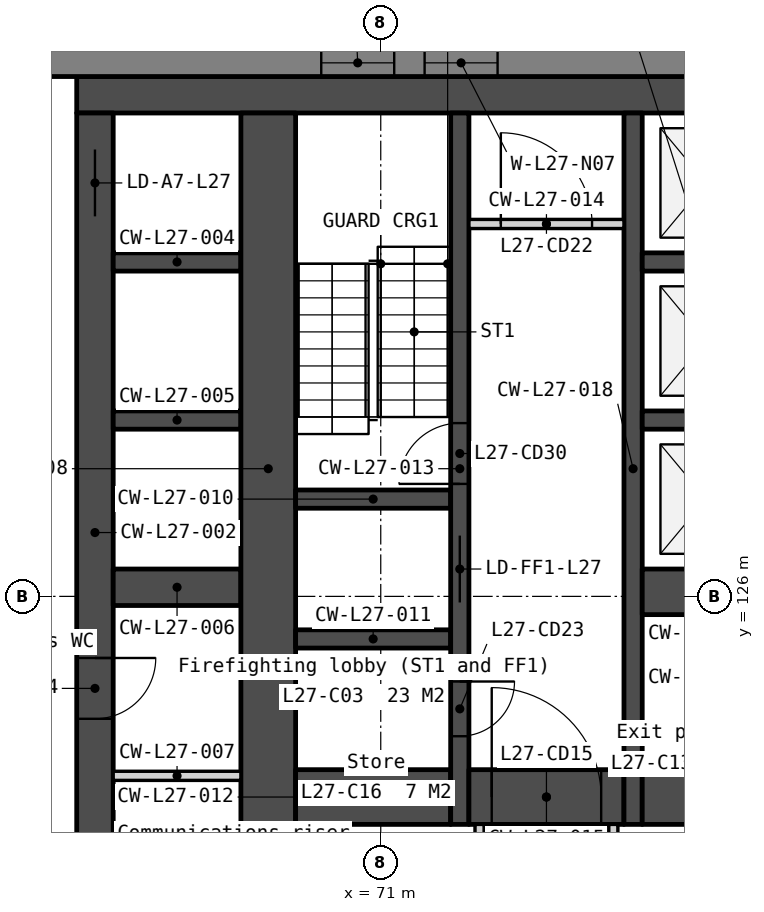
"""IFC4 building model, lengths in metres.
Left out: names, types, materials, properties, quantities, classifications, styles, units other than length and angle.
Written with IfcOpenShell. Run it as: python <this file> out.ifc"""

import sys

from ifc_helpers import new_model, si_unit, direction, frame, frame_2d, origin, place, context, subcontext, project, spatial, polyline, rectangle, outline, extrude, element, fill, save


model = new_model("IFC4")
c1 = context("Model", 3, precision=1e-05, world=origin(), true_north=direction((0.0, 1.0)))
c2 = subcontext(c1, "Body", "Model", "MODEL_VIEW")
j1 = project(units=[si_unit("LENGTHUNIT", "METRE"), si_unit("PLANEANGLEUNIT", "RADIAN")], contexts=[c1])
p1 = place(None, origin())
s1 = spatial("IfcSite", under=j1, at=p1, CompositionType="ELEMENT")
p2 = place(p1, origin())
s2 = spatial("IfcBuilding", under=s1, at=p2, CompositionType="ELEMENT")
p3 = place(p2, frame((0.0, 0.0, 109.8)))
s3 = spatial("IfcBuildingStorey", under=s2, at=p3, CompositionType="ELEMENT", Elevation=109.8)
p4 = place(p3, frame((66.0, 134.25, 0.0), z_axis=(0.0, 0.0, 1.0), x_axis=(1.0, 0.0, 0.0)))
e1 = element("IfcWall", 1, at=p4, inside=s3, PredefinedType="SOLIDWALL", context=c2, shape_type="SweptSolid", body=[
    extrude(rectangle(XDim=28.0, YDim=0.6, at=frame_2d((14.0, 0.0))), origin(), (0.0, 0.0, 1.0), 3.35),
])
p5 = place(p3, frame((66.3, 133.95, 0.0), z_axis=(0.0, 0.0, 1.0), x_axis=(0.0, -1.0, 0.0)))
e2 = element("IfcWall", 2, at=p5, inside=s3, PredefinedType="SOLIDWALL", context=c2, shape_type="SweptSolid", body=[
    extrude(rectangle(XDim=13.8, YDim=0.6, at=frame_2d((6.9, 0.0))), origin(), (0.0, 0.0, 1.0), 3.35),
])
p6 = place(p5, frame((0.6, 0.0, 0.0)))
e3 = element("IfcOpeningElement", 3, at=p6, cuts=e2, PredefinedType="OPENING", context=c2, shape_type="SweptSolid", body=[
    extrude(rectangle(XDim=1.1, YDim=2.1, at=frame_2d((0.55, 1.05))), frame((0.0, 0.31, 0.0), z_axis=(0.0, -1.0, 0.0), x_axis=(1.0, 0.0, 0.0)), (0.0, 0.0, 1.0), 0.62),
])
p7 = place(p5, frame((8.963, 0.0, 0.0)))
e4 = element("IfcOpeningElement", 4, at=p7, cuts=e2, PredefinedType="OPENING", context=c2, shape_type="SweptSolid", body=[
    extrude(rectangle(XDim=1.0, YDim=2.1, at=frame_2d((0.5, 1.05))), frame((0.0, 0.31, 0.0), z_axis=(0.0, -1.0, 0.0), x_axis=(1.0, 0.0, 0.0)), (0.0, 0.0, 1.0), 0.62),
])
p8 = place(p5, frame((11.888, 0.0, 0.0)))
e5 = element("IfcOpeningElement", 5, at=p8, cuts=e2, PredefinedType="OPENING", context=c2, shape_type="SweptSolid", body=[
    extrude(rectangle(XDim=1.0, YDim=2.1, at=frame_2d((0.5, 1.05))), frame((0.0, 0.31, 0.0), z_axis=(0.0, -1.0, 0.0), x_axis=(1.0, 0.0, 0.0)), (0.0, 0.0, 1.0), 0.62),
])
for number, where, z_axis, x_axis in (
    (6, (66.6, 131.5, 0.0), (0.0, 0.0, 1.0), (1.0, 0.0, 0.0)),
    (7, (66.6, 128.9, 0.0), (0.0, 0.0, 1.0), (1.0, 0.0, 0.0)),
):
    element("IfcWall", number, at=place(p3, frame(where, z_axis=z_axis, x_axis=x_axis)), inside=s3, PredefinedType="SOLIDWALL", context=c2, shape_type="SweptSolid", body=[
        extrude(rectangle(XDim=2.1, YDim=0.3, at=frame_2d((1.05, 0.0))), origin(), (0.0, 0.0, 1.0), 3.35),
    ])
p9 = place(p3, frame((66.6, 126.15, 0.0), z_axis=(0.0, 0.0, 1.0), x_axis=(1.0, 0.0, 0.0)))
e8 = element("IfcWall", 8, at=p9, inside=s3, PredefinedType="SOLIDWALL", context=c2, shape_type="SweptSolid", body=[
    extrude(rectangle(XDim=2.1, YDim=0.6, at=frame_2d((1.05, 0.0))), origin(), (0.0, 0.0, 1.0), 3.35),
])
p10 = place(p3, frame((66.6, 123.049, 0.0), z_axis=(0.0, 0.0, 1.0), x_axis=(1.0, 0.0, 0.0)))
e9 = element("IfcWall", 9, at=p10, inside=s3, PredefinedType="PARTITIONING", context=c2, shape_type="SweptSolid", body=[
    extrude(rectangle(XDim=2.1, YDim=0.15, at=frame_2d((1.05, 0.0))), origin(), (0.0, 0.0, 1.0), 3.35),
])
p11 = place(p3, frame((69.15, 133.95, 0.0), z_axis=(0.0, 0.0, 1.0), x_axis=(0.0, -1.0, 0.0)))
e10 = element("IfcWall", 10, at=p11, inside=s3, PredefinedType="SOLIDWALL", context=c2, shape_type="SweptSolid", body=[
    extrude(rectangle(XDim=11.7, YDim=0.9, at=frame_2d((5.85, 0.0))), origin(), (0.0, 0.0, 1.0), 3.35),
])
p12 = place(p3, frame((69.0, 122.25, 0.0), z_axis=(0.0, 0.0, 1.0), x_axis=(0.0, -1.0, 0.0)))
e11 = element("IfcWall", 11, at=p12, inside=s3, PredefinedType="SOLIDWALL", context=c2, shape_type="SweptSolid", body=[
    extrude(rectangle(XDim=2.1, YDim=0.6, at=frame_2d((1.05, 0.0))), origin(), (0.0, 0.0, 1.0), 3.35),
])
for number, where, z_axis, x_axis in (
    (12, (69.6, 127.6, 0.0), (0.0, 0.0, 1.0), (1.0, 0.0, 0.0)),
    (13, (69.6, 125.3, 0.0), (0.0, 0.0, 1.0), (1.0, 0.0, 0.0)),
):
    element("IfcWall", number, at=place(p3, frame(where, z_axis=z_axis, x_axis=x_axis)), inside=s3, PredefinedType="SOLIDWALL", context=c2, shape_type="SweptSolid", body=[
        extrude(rectangle(XDim=2.55, YDim=0.3, at=frame_2d((1.275, 0.0))), origin(), (0.0, 0.0, 1.0), 3.35),
    ])
p13 = place(p3, frame((69.6, 122.7, 0.0), z_axis=(0.0, 0.0, 1.0), x_axis=(1.0, 0.0, 0.0)))
e14 = element("IfcWall", 14, at=p13, inside=s3, PredefinedType="SOLIDWALL", context=c2, shape_type="SweptSolid", body=[
    extrude(rectangle(XDim=2.55, YDim=0.9, at=frame_2d((1.275, 0.0))), origin(), (0.0, 0.0, 1.0), 3.35),
])
p14 = place(p3, frame((72.3, 133.95, 0.0), z_axis=(0.0, 0.0, 1.0), x_axis=(0.0, -1.0, 0.0)))
e15 = element("IfcWall", 15, at=p14, inside=s3, PredefinedType="SOLIDWALL", context=c2, shape_type="SweptSolid", body=[
    extrude(rectangle(XDim=11.7, YDim=0.3, at=frame_2d((5.85, 0.0))), origin(), (0.0, 0.0, 1.0), 3.35),
])
p15 = place(p14, frame((6.95, 0.0, 0.0)))
e16 = element("IfcOpeningElement", 16, at=p15, cuts=e15, PredefinedType="OPENING", context=c2, shape_type="SweptSolid", body=[
    extrude(rectangle(XDim=1.1, YDim=2.1, at=frame_2d((0.55, 1.05))), frame((0.0, 0.16, 0.0), z_axis=(0.0, -1.0, 0.0), x_axis=(1.0, 0.0, 0.0)), (0.0, 0.0, 1.0), 0.32),
])
p16 = place(p14, frame((9.35, 0.0, 0.0)))
e17 = element("IfcOpeningElement", 17, at=p16, cuts=e15, PredefinedType="OPENING", context=c2, shape_type="SweptSolid", body=[
    extrude(rectangle(XDim=0.9, YDim=2.1, at=frame_2d((0.45, 1.05))), frame((0.0, 0.16, 0.0), z_axis=(0.0, -1.0, 0.0), x_axis=(1.0, 0.0, 0.0)), (0.0, 0.0, 1.0), 0.32),
])
p17 = place(p14, frame((5.1, 0.0, 0.0)))
e18 = element("IfcOpeningElement", 18, at=p17, cuts=e15, PredefinedType="OPENING", context=c2, shape_type="SweptSolid", body=[
    extrude(rectangle(XDim=1.0, YDim=2.1, at=frame_2d((0.5, 1.05))), frame((0.0, 0.16, 0.0), z_axis=(0.0, -1.0, 0.0), x_axis=(1.0, 0.0, 0.0)), (0.0, 0.0, 1.0), 0.32),
])
p18 = place(p3, frame((72.45, 132.125, 0.0), z_axis=(0.0, 0.0, 1.0), x_axis=(1.0, 0.0, 0.0)))
e19 = element("IfcWall", 19, at=p18, inside=s3, PredefinedType="PARTITIONING", context=c2, shape_type="SweptSolid", body=[
    extrude(rectangle(XDim=2.55, YDim=0.15, at=frame_2d((1.275, 0.0))), origin(), (0.0, 0.0, 1.0), 3.35),
])
p19 = place(p18, frame((0.525, 0.0, 0.0)))
e20 = element("IfcOpeningElement", 20, at=p19, cuts=e19, PredefinedType="OPENING", context=c2, shape_type="SweptSolid", body=[
    extrude(rectangle(XDim=1.5, YDim=2.1, at=frame_2d((0.75, 1.05))), frame((0.0, 0.085, 0.0), z_axis=(0.0, -1.0, 0.0), x_axis=(1.0, 0.0, 0.0)), (0.0, 0.0, 1.0), 0.17),
])
p20 = place(p3, frame((72.45, 122.7, 0.0), z_axis=(0.0, 0.0, 1.0), x_axis=(1.0, 0.0, 0.0)))
e21 = element("IfcWall", 21, at=p20, inside=s3, PredefinedType="SOLIDWALL", context=c2, shape_type="SweptSolid", body=[
    extrude(rectangle(XDim=2.55, YDim=0.9, at=frame_2d((1.275, 0.0))), origin(), (0.0, 0.0, 1.0), 3.35),
])
p21 = place(p20, frame((0.375, 0.0, 0.0)))
e22 = element("IfcOpeningElement", 22, at=p21, cuts=e21, PredefinedType="OPENING", context=c2, shape_type="SweptSolid", body=[
    extrude(rectangle(XDim=1.8, YDim=2.1, at=frame_2d((0.9, 1.05))), frame((0.0, 0.46, 0.0), z_axis=(0.0, -1.0, 0.0), x_axis=(1.0, 0.0, 0.0)), (0.0, 0.0, 1.0), 0.92),
])
for number, where, z_axis, x_axis in (
    (23, (72.625, 122.25, 0.0), (0.0, 0.0, 1.0), (0.0, -1.0, 0.0)),
    (24, (74.825, 122.25, 0.0), (0.0, 0.0, 1.0), (0.0, -1.0, 0.0)),
):
    element("IfcWall", number, at=place(p3, frame(where, z_axis=z_axis, x_axis=x_axis)), inside=s3, PredefinedType="PARTITIONING", context=c2, shape_type="SweptSolid", body=[
        extrude(rectangle(XDim=2.1, YDim=0.15, at=frame_2d((1.05, 0.0))), origin(), (0.0, 0.0, 1.0), 3.35),
    ])
p22 = place(p3, frame((75.15, 133.95, 0.0), z_axis=(0.0, 0.0, 1.0), x_axis=(0.0, -1.0, 0.0)))
e25 = element("IfcWall", 25, at=p22, inside=s3, PredefinedType="SOLIDWALL", context=c2, shape_type="SweptSolid", body=[
    extrude(rectangle(XDim=11.7, YDim=0.3, at=frame_2d((5.85, 0.0))), origin(), (0.0, 0.0, 1.0), 3.35),
])
for number, where, z_axis, x_axis in (
    (26, (75.3, 131.5, 0.0), (0.0, 0.0, 1.0), (1.0, 0.0, 0.0)),
    (27, (75.3, 128.9, 0.0), (0.0, 0.0, 1.0), (1.0, 0.0, 0.0)),
):
    element("IfcWall", number, at=place(p3, frame(where, z_axis=z_axis, x_axis=x_axis)), inside=s3, PredefinedType="SOLIDWALL", context=c2, shape_type="SweptSolid", body=[
        extrude(rectangle(XDim=2.1, YDim=0.3, at=frame_2d((1.05, 0.0))), origin(), (0.0, 0.0, 1.0), 3.35),
    ])
p23 = place(p3, frame((75.3, 126.075, 0.0), z_axis=(0.0, 0.0, 1.0), x_axis=(1.0, 0.0, 0.0)))
e28 = element("IfcWall", 28, at=p23, inside=s3, PredefinedType="SOLIDWALL", context=c2, shape_type="SweptSolid", body=[
    extrude(rectangle(XDim=2.1, YDim=0.75, at=frame_2d((1.05, 0.0))), origin(), (0.0, 0.0, 1.0), 3.35),
])
p24 = place(p3, frame((75.3, 122.7, 0.0), z_axis=(0.0, 0.0, 1.0), x_axis=(1.0, 0.0, 0.0)))
e29 = element("IfcWall", 29, at=p24, inside=s3, PredefinedType="SOLIDWALL", context=c2, shape_type="SweptSolid", body=[
    extrude(rectangle(XDim=6.2, YDim=0.9, at=frame_2d((3.1, 0.0))), origin(), (0.0, 0.0, 1.0), 3.35),
])
p25 = place(p3, frame((101.322, 134.775, -0.15), z_axis=(0.0, 0.0, 1.0), x_axis=(-1.0, 0.0, 0.0)))
e30 = element("IfcWall", 30, at=p25, inside=s3, PredefinedType="SOLIDWALL", context=c2, shape_type="SweptSolid", body=[
    extrude(outline(polyline([(42.643, 0.0), (42.643, 3.5), (0.0, 3.5), (0.0, 0.0), (42.643, 0.0)])), frame((0.0, 0.225, 0.0), z_axis=(0.0, -1.0, 0.0), x_axis=(1.0, 0.0, 0.0)), (0.0, 0.0, 1.0), 0.45),
])
p26 = place(p25, frame((2.814, 0.0, 1.05)))
e31 = element("IfcOpeningElement", 31, at=p26, cuts=e30, PredefinedType="OPENING", context=c2, shape_type="SweptSolid", body=[
    extrude(rectangle(XDim=1.2, YDim=1.5, at=frame_2d((0.6, 0.75))), frame((0.0, 0.235, 0.0), z_axis=(0.0, -1.0, 0.0), x_axis=(1.0, 0.0, 0.0)), (0.0, 0.0, 1.0), 0.47),
])
p27 = place(p25, frame((4.514, 0.0, 1.05)))
e32 = element("IfcOpeningElement", 32, at=p27, cuts=e30, PredefinedType="OPENING", context=c2, shape_type="SweptSolid", body=[
    extrude(rectangle(XDim=1.2, YDim=1.5, at=frame_2d((0.6, 0.75))), frame((0.0, 0.235, 0.0), z_axis=(0.0, -1.0, 0.0), x_axis=(1.0, 0.0, 0.0)), (0.0, 0.0, 1.0), 0.47),
])
p28 = place(p25, frame((11.343, 0.0, 1.05)))
e33 = element("IfcOpeningElement", 33, at=p28, cuts=e30, PredefinedType="OPENING", context=c2, shape_type="SweptSolid", body=[
    extrude(rectangle(XDim=1.2, YDim=1.5, at=frame_2d((0.6, 0.75))), frame((0.0, 0.235, 0.0), z_axis=(0.0, -1.0, 0.0), x_axis=(1.0, 0.0, 0.0)), (0.0, 0.0, 1.0), 0.47),
])
p29 = place(p25, frame((13.043, 0.0, 1.05)))
e34 = element("IfcOpeningElement", 34, at=p29, cuts=e30, PredefinedType="OPENING", context=c2, shape_type="SweptSolid", body=[
    extrude(rectangle(XDim=1.2, YDim=1.5, at=frame_2d((0.6, 0.75))), frame((0.0, 0.235, 0.0), z_axis=(0.0, -1.0, 0.0), x_axis=(1.0, 0.0, 0.0)), (0.0, 0.0, 1.0), 0.47),
])
p30 = place(p25, frame((19.872, 0.0, 1.05)))
e35 = element("IfcOpeningElement", 35, at=p30, cuts=e30, PredefinedType="OPENING", context=c2, shape_type="SweptSolid", body=[
    extrude(rectangle(XDim=1.2, YDim=1.5, at=frame_2d((0.6, 0.75))), frame((0.0, 0.235, 0.0), z_axis=(0.0, -1.0, 0.0), x_axis=(1.0, 0.0, 0.0)), (0.0, 0.0, 1.0), 0.47),
])
p31 = place(p25, frame((21.572, 0.0, 1.05)))
e36 = element("IfcOpeningElement", 36, at=p31, cuts=e30, PredefinedType="OPENING", context=c2, shape_type="SweptSolid", body=[
    extrude(rectangle(XDim=1.2, YDim=1.5, at=frame_2d((0.6, 0.75))), frame((0.0, 0.235, 0.0), z_axis=(0.0, -1.0, 0.0), x_axis=(1.0, 0.0, 0.0)), (0.0, 0.0, 1.0), 0.47),
])
p32 = place(p25, frame((28.4, 0.0, 1.05)))
e37 = element("IfcOpeningElement", 37, at=p32, cuts=e30, PredefinedType="OPENING", context=c2, shape_type="SweptSolid", body=[
    extrude(rectangle(XDim=1.2, YDim=1.5, at=frame_2d((0.6, 0.75))), frame((0.0, 0.235, 0.0), z_axis=(0.0, -1.0, 0.0), x_axis=(1.0, 0.0, 0.0)), (0.0, 0.0, 1.0), 0.47),
])
p33 = place(p25, frame((30.1, 0.0, 1.05)))
e38 = element("IfcOpeningElement", 38, at=p33, cuts=e30, PredefinedType="OPENING", context=c2, shape_type="SweptSolid", body=[
    extrude(rectangle(XDim=1.2, YDim=1.5, at=frame_2d((0.6, 0.75))), frame((0.0, 0.235, 0.0), z_axis=(0.0, -1.0, 0.0), x_axis=(1.0, 0.0, 0.0)), (0.0, 0.0, 1.0), 0.47),
])
p34 = place(p25, frame((36.929, 0.0, 1.05)))
e39 = element("IfcOpeningElement", 39, at=p34, cuts=e30, PredefinedType="OPENING", context=c2, shape_type="SweptSolid", body=[
    extrude(rectangle(XDim=1.2, YDim=1.5, at=frame_2d((0.6, 0.75))), frame((0.0, 0.235, 0.0), z_axis=(0.0, -1.0, 0.0), x_axis=(1.0, 0.0, 0.0)), (0.0, 0.0, 1.0), 0.47),
])
p35 = place(p25, frame((38.629, 0.0, 1.05)))
e40 = element("IfcOpeningElement", 40, at=p35, cuts=e30, PredefinedType="OPENING", context=c2, shape_type="SweptSolid", body=[
    extrude(rectangle(XDim=1.2, YDim=1.5, at=frame_2d((0.6, 0.75))), frame((0.0, 0.235, 0.0), z_axis=(0.0, -1.0, 0.0), x_axis=(1.0, 0.0, 0.0)), (0.0, 0.0, 1.0), 0.47),
])
p36 = place(p3, frame((56.073, 130.263, -0.15), z_axis=(0.0, 0.0, 1.0), x_axis=(0.500000478905, -0.866025127289, 0.0)))
e41 = element("IfcWall", 41, at=p36, inside=s3, PredefinedType="SOLIDWALL", context=c2, shape_type="SweptSolid", body=[
    extrude(outline(polyline([(42.643, 0.0), (42.643, 3.5), (0.0, 3.5), (0.0, 0.0), (42.643, 0.0)])), frame((0.0, 0.225, 0.0), z_axis=(0.0, -1.0, 0.0), x_axis=(1.0, 0.0, 0.0)), (0.0, 0.0, 1.0), 0.45),
])
p37 = place(p36, frame((2.814, 0.0, 1.05)))
e42 = element("IfcOpeningElement", 42, at=p37, cuts=e41, PredefinedType="OPENING", context=c2, shape_type="SweptSolid", body=[
    extrude(rectangle(XDim=1.2, YDim=1.5, at=frame_2d((0.6, 0.75))), frame((0.0, 0.235, 0.0), z_axis=(0.0, -1.0, 0.0), x_axis=(1.0, 0.0, 0.0)), (0.0, 0.0, 1.0), 0.47),
])
p38 = place(p36, frame((4.514, 0.0, 1.05)))
e43 = element("IfcOpeningElement", 43, at=p38, cuts=e41, PredefinedType="OPENING", context=c2, shape_type="SweptSolid", body=[
    extrude(rectangle(XDim=1.2, YDim=1.5, at=frame_2d((0.6, 0.75))), frame((0.0, 0.235, 0.0), z_axis=(0.0, -1.0, 0.0), x_axis=(1.0, 0.0, 0.0)), (0.0, 0.0, 1.0), 0.47),
])
p39 = place(p36, frame((11.343, 0.0, 1.05)))
e44 = element("IfcOpeningElement", 44, at=p39, cuts=e41, PredefinedType="OPENING", context=c2, shape_type="SweptSolid", body=[
    extrude(rectangle(XDim=1.2, YDim=1.5, at=frame_2d((0.6, 0.75))), frame((0.0, 0.235, 0.0), z_axis=(0.0, -1.0, 0.0), x_axis=(1.0, 0.0, 0.0)), (0.0, 0.0, 1.0), 0.47),
])
p40 = place(p36, frame((13.043, 0.0, 1.05)))
e45 = element("IfcOpeningElement", 45, at=p40, cuts=e41, PredefinedType="OPENING", context=c2, shape_type="SweptSolid", body=[
    extrude(rectangle(XDim=1.2, YDim=1.5, at=frame_2d((0.6, 0.75))), frame((0.0, 0.235, 0.0), z_axis=(0.0, -1.0, 0.0), x_axis=(1.0, 0.0, 0.0)), (0.0, 0.0, 1.0), 0.47),
])
p41 = place(p36, frame((19.872, 0.0, 1.05)))
e46 = element("IfcOpeningElement", 46, at=p41, cuts=e41, PredefinedType="OPENING", context=c2, shape_type="SweptSolid", body=[
    extrude(rectangle(XDim=1.2, YDim=1.5, at=frame_2d((0.6, 0.75))), frame((0.0, 0.235, 0.0), z_axis=(0.0, -1.0, 0.0), x_axis=(1.0, 0.0, 0.0)), (0.0, 0.0, 1.0), 0.47),
])
p42 = place(p36, frame((21.572, 0.0, 1.05)))
e47 = element("IfcOpeningElement", 47, at=p42, cuts=e41, PredefinedType="OPENING", context=c2, shape_type="SweptSolid", body=[
    extrude(rectangle(XDim=1.2, YDim=1.5, at=frame_2d((0.6, 0.75))), frame((0.0, 0.235, 0.0), z_axis=(0.0, -1.0, 0.0), x_axis=(1.0, 0.0, 0.0)), (0.0, 0.0, 1.0), 0.47),
])
p43 = place(p36, frame((28.4, 0.0, 1.05)))
e48 = element("IfcOpeningElement", 48, at=p43, cuts=e41, PredefinedType="OPENING", context=c2, shape_type="SweptSolid", body=[
    extrude(rectangle(XDim=1.2, YDim=1.5, at=frame_2d((0.6, 0.75))), frame((0.0, 0.235, 0.0), z_axis=(0.0, -1.0, 0.0), x_axis=(1.0, 0.0, 0.0)), (0.0, 0.0, 1.0), 0.47),
])
p44 = place(p36, frame((30.1, 0.0, 1.05)))
e49 = element("IfcOpeningElement", 49, at=p44, cuts=e41, PredefinedType="OPENING", context=c2, shape_type="SweptSolid", body=[
    extrude(rectangle(XDim=1.2, YDim=1.5, at=frame_2d((0.6, 0.75))), frame((0.0, 0.235, 0.0), z_axis=(0.0, -1.0, 0.0), x_axis=(1.0, 0.0, 0.0)), (0.0, 0.0, 1.0), 0.47),
])
p45 = place(p36, frame((36.929, 0.0, 1.05)))
e50 = element("IfcOpeningElement", 50, at=p45, cuts=e41, PredefinedType="OPENING", context=c2, shape_type="SweptSolid", body=[
    extrude(rectangle(XDim=1.2, YDim=1.5, at=frame_2d((0.6, 0.75))), frame((0.0, 0.235, 0.0), z_axis=(0.0, -1.0, 0.0), x_axis=(1.0, 0.0, 0.0)), (0.0, 0.0, 1.0), 0.47),
])
p46 = place(p36, frame((38.629, 0.0, 1.05)))
e51 = element("IfcOpeningElement", 51, at=p46, cuts=e41, PredefinedType="OPENING", context=c2, shape_type="SweptSolid", body=[
    extrude(rectangle(XDim=1.2, YDim=1.5, at=frame_2d((0.6, 0.75))), frame((0.0, 0.235, 0.0), z_axis=(0.0, -1.0, 0.0), x_axis=(1.0, 0.0, 0.0)), (0.0, 0.0, 1.0), 0.47),
])
p47 = place(p6, origin())
e52 = element("IfcDoor", 52, at=p47, inside=s3, OperationType="SLIDING_TO_LEFT", PredefinedType="DOOR", context=c2, shape_type="SweptSolid", body=[
    extrude(rectangle(XDim=1.1, YDim=2.1, at=frame_2d((0.55, 1.05))), frame((0.0, 0.025, 0.0), z_axis=(0.0, -1.0, 0.0), x_axis=(1.0, 0.0, 0.0)), (0.0, 0.0, 1.0), 0.05),
])
fill(e3, e52)
p48 = place(p15, origin())
e53 = element("IfcDoor", 53, at=p48, inside=s3, OperationType="SLIDING_TO_LEFT", PredefinedType="DOOR", context=c2, shape_type="SweptSolid", body=[
    extrude(rectangle(XDim=1.1, YDim=2.1, at=frame_2d((0.55, 1.05))), frame((0.0, 0.025, 0.0), z_axis=(0.0, -1.0, 0.0), x_axis=(1.0, 0.0, 0.0)), (0.0, 0.0, 1.0), 0.05),
])
fill(e16, e53)
p49 = place(p21, origin())
e54 = element("IfcDoor", 54, at=p49, inside=s3, OperationType="DOUBLE_DOOR_DOUBLE_SWING", PredefinedType="DOOR", context=c2, shape_type="SweptSolid", body=[
    extrude(rectangle(XDim=1.8, YDim=2.1, at=frame_2d((0.9, 1.05))), frame((0.0, 0.025, 0.0), z_axis=(0.0, -1.0, 0.0), x_axis=(1.0, 0.0, 0.0)), (0.0, 0.0, 1.0), 0.05),
])
fill(e22, e54)
p50 = place(p19, origin())
e55 = element("IfcDoor", 55, at=p50, inside=s3, OperationType="DOUBLE_DOOR_DOUBLE_SWING", PredefinedType="DOOR", context=c2, shape_type="SweptSolid", body=[
    extrude(rectangle(XDim=1.5, YDim=2.1, at=frame_2d((0.75, 1.05))), frame((0.0, 0.025, 0.0), z_axis=(0.0, -1.0, 0.0), x_axis=(1.0, 0.0, 0.0)), (0.0, 0.0, 1.0), 0.05),
])
fill(e20, e55)
p51 = place(p16, origin())
e56 = element("IfcDoor", 56, at=p51, inside=s3, OperationType="SINGLE_SWING_LEFT", PredefinedType="DOOR", context=c2, shape_type="SweptSolid", body=[
    extrude(rectangle(XDim=0.9, YDim=2.1, at=frame_2d((0.45, 1.05))), frame((0.0, 0.025, 0.0), z_axis=(0.0, -1.0, 0.0), x_axis=(1.0, 0.0, 0.0)), (0.0, 0.0, 1.0), 0.05),
])
fill(e17, e56)
p52 = place(p17, origin())
e57 = element("IfcDoor", 57, at=p52, inside=s3, OperationType="SINGLE_SWING_RIGHT", PredefinedType="DOOR", context=c2, shape_type="SweptSolid", body=[
    extrude(rectangle(XDim=1.0, YDim=2.1, at=frame_2d((0.5, 1.05))), frame((0.0, 0.025, 0.0), z_axis=(0.0, -1.0, 0.0), x_axis=(1.0, 0.0, 0.0)), (0.0, 0.0, 1.0), 0.05),
])
fill(e18, e57)
p53 = place(p7, origin())
e58 = element("IfcDoor", 58, at=p53, inside=s3, OperationType="SINGLE_SWING_LEFT", PredefinedType="DOOR", context=c2, shape_type="SweptSolid", body=[
    extrude(rectangle(XDim=1.0, YDim=2.1, at=frame_2d((0.5, 1.05))), frame((0.0, 0.025, 0.0), z_axis=(0.0, -1.0, 0.0), x_axis=(1.0, 0.0, 0.0)), (0.0, 0.0, 1.0), 0.05),
])
fill(e4, e58)
p54 = place(p32, origin())
e59 = element("IfcWindow", 59, at=p54, inside=s3, PartitioningType="SINGLE_PANEL", PredefinedType="WINDOW", context=c2, shape_type="SweptSolid", body=[
    extrude(rectangle(XDim=1.2, YDim=1.5, at=frame_2d((0.6, 0.75))), frame((0.0, 0.03, 0.0), z_axis=(0.0, -1.0, 0.0), x_axis=(1.0, 0.0, 0.0)), (0.0, 0.0, 1.0), 0.06),
])
fill(e37, e59)
p55 = place(p33, origin())
e60 = element("IfcWindow", 60, at=p55, inside=s3, PartitioningType="SINGLE_PANEL", PredefinedType="WINDOW", context=c2, shape_type="SweptSolid", body=[
    extrude(rectangle(XDim=1.2, YDim=1.5, at=frame_2d((0.6, 0.75))), frame((0.0, 0.03, 0.0), z_axis=(0.0, -1.0, 0.0), x_axis=(1.0, 0.0, 0.0)), (0.0, 0.0, 1.0), 0.06),
])
fill(e38, e60)
save(model, sys.argv[1])
